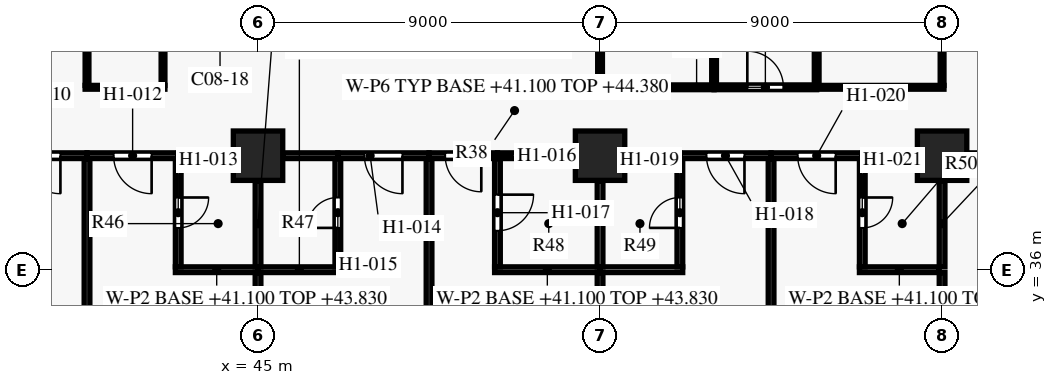
"""IFC4 building model, lengths in metres.
Left out: names, types, materials, properties, quantities, classifications, styles, units other than length and angle.
Written with IfcOpenShell. Run it as: python <this file> out.ifc"""

import sys

from ifc_helpers import new_model, si_unit, direction, frame, frame_2d, origin, origin_2d, place, context, subcontext, project, spatial, rectangle, extrude, element, fill, save


model = new_model("IFC4")
c1 = context("Model", 3, precision=1e-05, world=origin(), true_north=direction((0.0, 1.0)))
c2 = subcontext(c1, "Body", "Model", "MODEL_VIEW")
j1 = project(units=[si_unit("LENGTHUNIT", "METRE"), si_unit("PLANEANGLEUNIT", "RADIAN")], contexts=[c1])
p1 = place(None, origin())
s1 = spatial("IfcSite", under=j1, at=p1, CompositionType="ELEMENT")
p2 = place(p1, origin())
s2 = spatial("IfcBuilding", under=s1, at=p2, CompositionType="ELEMENT")
p3 = place(p2, frame((0.0, 0.0, 41.1)))
s3 = spatial("IfcBuildingStorey", under=s2, at=p3, CompositionType="ELEMENT", Elevation=41.1)
for number, where, z_axis, x_axis in (
    (1, (45.0, 39.0, 0.0), (0.0, 0.0, 1.0), (1.0, 0.0, 0.0)),
    (2, (54.0, 39.0, 0.0), (0.0, 0.0, 1.0), (1.0, 0.0, 0.0)),
    (3, (63.0, 39.0, 0.0), (0.0, 0.0, 1.0), (1.0, 0.0, 0.0)),
):
    element("IfcColumn", number, at=place(p3, frame(where, z_axis=z_axis, x_axis=x_axis)), inside=s3, PredefinedType="COLUMN", context=c2, shape_type="SweptSolid", body=[
        extrude(rectangle(XDim=1.3, YDim=1.3, at=origin_2d()), origin(), (0.0, 0.0, 1.0), 3.6),
    ])
p4 = place(p3, frame((45.0, 35.925, 0.0), z_axis=(0.0, 0.0, 1.0), x_axis=(0.0, -1.0, 0.0)))
e4 = element("IfcWall", 4, at=p4, inside=s3, PredefinedType="PARTITIONING", context=c2, shape_type="SweptSolid", body=[
    extrude(rectangle(XDim=8.8, YDim=0.15, at=frame_2d((4.4, 0.0))), origin(), (0.0, 0.0, 1.0), 2.73),
])
p5 = place(p3, frame((54.0, 35.925, 0.0), z_axis=(0.0, 0.0, 1.0), x_axis=(0.0, -1.0, 0.0)))
e5 = element("IfcWall", 5, at=p5, inside=s3, PredefinedType="PARTITIONING", context=c2, shape_type="SweptSolid", body=[
    extrude(rectangle(XDim=7.9, YDim=0.15, at=frame_2d((3.95, 0.0))), origin(), (0.0, 0.0, 1.0), 2.73),
])
p6 = place(p3, frame((63.0, 35.925, 0.0), z_axis=(0.0, 0.0, 1.0), x_axis=(0.0, -1.0, 0.0)))
e6 = element("IfcWall", 6, at=p6, inside=s3, PredefinedType="PARTITIONING", context=c2, shape_type="SweptSolid", body=[
    extrude(rectangle(XDim=8.8, YDim=0.15, at=frame_2d((4.4, 0.0))), origin(), (0.0, 0.0, 1.0), 2.73),
])
for number, where, z_axis, x_axis in (
    (7, (42.825, 36.0, 0.0), (0.0, 0.0, 1.0), (1.0, 0.0, 0.0)),
    (8, (45.0, 36.0, 0.0), (0.0, 0.0, 1.0), (1.0, 0.0, 0.0)),
):
    element("IfcWall", number, at=place(p3, frame(where, z_axis=z_axis, x_axis=x_axis)), inside=s3, PredefinedType="PARTITIONING", context=c2, shape_type="SweptSolid", body=[
        extrude(rectangle(XDim=2.175, YDim=0.15, at=frame_2d((1.087, 0.0))), origin(), (0.0, 0.0, 1.0), 2.73),
    ])
p7 = place(p3, frame((51.225, 36.0, 0.0), z_axis=(0.0, 0.0, 1.0), x_axis=(1.0, 0.0, 0.0)))
e9 = element("IfcWall", 9, at=p7, inside=s3, PredefinedType="PARTITIONING", context=c2, shape_type="SweptSolid", body=[
    extrude(rectangle(XDim=2.775, YDim=0.15, at=frame_2d((1.387, 0.0))), origin(), (0.0, 0.0, 1.0), 2.73),
])
p8 = place(p3, frame((54.0, 36.0, 0.0), z_axis=(0.0, 0.0, 1.0), x_axis=(1.0, 0.0, 0.0)))
e10 = element("IfcWall", 10, at=p8, inside=s3, PredefinedType="PARTITIONING", context=c2, shape_type="SweptSolid", body=[
    extrude(rectangle(XDim=2.175, YDim=0.15, at=frame_2d((1.087, 0.0))), origin(), (0.0, 0.0, 1.0), 2.73),
])
p9 = place(p3, frame((60.825, 36.0, 0.0), z_axis=(0.0, 0.0, 1.0), x_axis=(1.0, 0.0, 0.0)))
e11 = element("IfcWall", 11, at=p9, inside=s3, PredefinedType="PARTITIONING", context=c2, shape_type="SweptSolid", body=[
    extrude(rectangle(XDim=2.1, YDim=0.15, at=frame_2d((1.05, 0.0))), origin(), (0.0, 0.0, 1.0), 2.73),
])
p10 = place(p3, frame((47.1, 36.075, 0.0), z_axis=(0.0, 0.0, 1.0), x_axis=(0.0, 1.0, 0.0)))
e12 = element("IfcWall", 12, at=p10, inside=s3, PredefinedType="PARTITIONING", context=c2, shape_type="SweptSolid", body=[
    extrude(rectangle(XDim=2.85, YDim=0.15, at=frame_2d((1.425, 0.0))), origin(), (0.0, 0.0, 1.0), 2.58),
])
p11 = place(p10, frame((1.025, 0.0, 0.0)))
e13 = element("IfcOpeningElement", 13, at=p11, cuts=e12, PredefinedType="OPENING", context=c2, shape_type="SweptSolid", body=[
    extrude(rectangle(XDim=0.8, YDim=2.1, at=frame_2d((0.4, 1.05))), frame((0.0, 0.085, 0.0), z_axis=(0.0, -1.0, 0.0), x_axis=(1.0, 0.0, 0.0)), (0.0, 0.0, 1.0), 0.17),
])
p12 = place(p3, frame((56.1, 36.075, 0.0), z_axis=(0.0, 0.0, 1.0), x_axis=(0.0, 1.0, 0.0)))
e14 = element("IfcWall", 14, at=p12, inside=s3, PredefinedType="PARTITIONING", context=c2, shape_type="SweptSolid", body=[
    extrude(rectangle(XDim=2.85, YDim=0.15, at=frame_2d((1.425, 0.0))), origin(), (0.0, 0.0, 1.0), 2.58),
])
p13 = place(p12, frame((1.025, 0.0, 0.0)))
e15 = element("IfcOpeningElement", 15, at=p13, cuts=e14, PredefinedType="OPENING", context=c2, shape_type="SweptSolid", body=[
    extrude(rectangle(XDim=0.8, YDim=2.1, at=frame_2d((0.4, 1.05))), frame((0.0, 0.085, 0.0), z_axis=(0.0, -1.0, 0.0), x_axis=(1.0, 0.0, 0.0)), (0.0, 0.0, 1.0), 0.17),
])
for number, where, z_axis, x_axis in (
    (16, (45.0, 38.345, 0.0), (0.0, 0.0, 1.0), (0.0, -1.0, 0.0)),
    (17, (54.0, 38.345, 0.0), (0.0, 0.0, 1.0), (0.0, -1.0, 0.0)),
    (18, (63.0, 38.345, 0.0), (0.0, 0.0, 1.0), (0.0, -1.0, 0.0)),
):
    element("IfcWall", number, at=place(p3, frame(where, z_axis=z_axis, x_axis=x_axis)), inside=s3, PredefinedType="PARTITIONING", context=c2, shape_type="SweptSolid", body=[
        extrude(rectangle(XDim=2.27, YDim=0.15, at=frame_2d((1.135, 0.0))), origin(), (0.0, 0.0, 1.0), 2.73),
    ])
p14 = place(p3, frame((40.5, 38.925, 0.0), z_axis=(0.0, 0.0, 1.0), x_axis=(0.0, -1.0, 0.0)))
e19 = element("IfcWall", 19, at=p14, inside=s3, PredefinedType="PARTITIONING", context=c2, shape_type="SweptSolid", body=[
    extrude(rectangle(XDim=11.35, YDim=0.15, at=frame_2d((5.675, 0.0))), origin(), (0.0, 0.0, 1.0), 2.58),
])
p15 = place(p3, frame((42.9, 38.925, 0.0), z_axis=(0.0, 0.0, 1.0), x_axis=(0.0, -1.0, 0.0)))
e20 = element("IfcWall", 20, at=p15, inside=s3, PredefinedType="PARTITIONING", context=c2, shape_type="SweptSolid", body=[
    extrude(rectangle(XDim=2.85, YDim=0.15, at=frame_2d((1.425, 0.0))), origin(), (0.0, 0.0, 1.0), 2.58),
])
p16 = place(p15, frame((1.025, 0.0, 0.0)))
e21 = element("IfcOpeningElement", 21, at=p16, cuts=e20, PredefinedType="OPENING", context=c2, shape_type="SweptSolid", body=[
    extrude(rectangle(XDim=0.8, YDim=2.1, at=frame_2d((0.4, 1.05))), frame((0.0, 0.085, 0.0), z_axis=(0.0, -1.0, 0.0), x_axis=(1.0, 0.0, 0.0)), (0.0, 0.0, 1.0), 0.17),
])
p17 = place(p3, frame((49.5, 38.925, 0.0), z_axis=(0.0, 0.0, 1.0), x_axis=(0.0, -1.0, 0.0)))
e22 = element("IfcWall", 22, at=p17, inside=s3, PredefinedType="PARTITIONING", context=c2, shape_type="SweptSolid", body=[
    extrude(rectangle(XDim=11.35, YDim=0.15, at=frame_2d((5.675, 0.0))), origin(), (0.0, 0.0, 1.0), 2.58),
])
p18 = place(p3, frame((51.3, 38.925, 0.0), z_axis=(0.0, 0.0, 1.0), x_axis=(0.0, -1.0, 0.0)))
e23 = element("IfcWall", 23, at=p18, inside=s3, PredefinedType="PARTITIONING", context=c2, shape_type="SweptSolid", body=[
    extrude(rectangle(XDim=2.85, YDim=0.15, at=frame_2d((1.425, 0.0))), origin(), (0.0, 0.0, 1.0), 2.58),
])
p19 = place(p18, frame((0.95, 0.0, 0.0)))
e24 = element("IfcOpeningElement", 24, at=p19, cuts=e23, PredefinedType="OPENING", context=c2, shape_type="SweptSolid", body=[
    extrude(rectangle(XDim=0.95, YDim=2.1, at=frame_2d((0.475, 1.05))), frame((0.0, 0.085, 0.0), z_axis=(0.0, -1.0, 0.0), x_axis=(1.0, 0.0, 0.0)), (0.0, 0.0, 1.0), 0.17),
])
p20 = place(p3, frame((58.5, 38.925, 0.0), z_axis=(0.0, 0.0, 1.0), x_axis=(0.0, -1.0, 0.0)))
e25 = element("IfcWall", 25, at=p20, inside=s3, PredefinedType="PARTITIONING", context=c2, shape_type="SweptSolid", body=[
    extrude(rectangle(XDim=11.35, YDim=0.15, at=frame_2d((5.675, 0.0))), origin(), (0.0, 0.0, 1.0), 2.58),
])
p21 = place(p3, frame((60.9, 38.925, 0.0), z_axis=(0.0, 0.0, 1.0), x_axis=(0.0, -1.0, 0.0)))
e26 = element("IfcWall", 26, at=p21, inside=s3, PredefinedType="PARTITIONING", context=c2, shape_type="SweptSolid", body=[
    extrude(rectangle(XDim=2.85, YDim=0.15, at=frame_2d((1.425, 0.0))), origin(), (0.0, 0.0, 1.0), 2.58),
])
p22 = place(p21, frame((1.025, 0.0, 0.0)))
e27 = element("IfcOpeningElement", 27, at=p22, cuts=e26, PredefinedType="OPENING", context=c2, shape_type="SweptSolid", body=[
    extrude(rectangle(XDim=0.8, YDim=2.1, at=frame_2d((0.4, 1.05))), frame((0.0, 0.085, 0.0), z_axis=(0.0, -1.0, 0.0), x_axis=(1.0, 0.0, 0.0)), (0.0, 0.0, 1.0), 0.17),
])
p23 = place(p3, frame((40.5, 39.0, 0.0), z_axis=(0.0, 0.0, 1.0), x_axis=(-1.0, 0.0, 0.0)))
e28 = element("IfcWall", 28, at=p23, inside=s3, PredefinedType="PARTITIONING", context=c2, shape_type="SweptSolid", body=[
    extrude(rectangle(XDim=2.4, YDim=0.15, at=frame_2d((1.2, 0.0))), origin(), (0.0, 0.0, 1.0), 2.58),
])
p24 = place(p23, frame((0.7, 0.0, 0.0)))
e29 = element("IfcOpeningElement", 29, at=p24, cuts=e28, PredefinedType="OPENING", context=c2, shape_type="SweptSolid", body=[
    extrude(rectangle(XDim=1.0, YDim=2.1, at=frame_2d((0.5, 1.05))), frame((0.0, 0.085, 0.0), z_axis=(0.0, -1.0, 0.0), x_axis=(1.0, 0.0, 0.0)), (0.0, 0.0, 1.0), 0.17),
])
p25 = place(p3, frame((42.9, 39.0, 0.0), z_axis=(0.0, 0.0, 1.0), x_axis=(-1.0, 0.0, 0.0)))
e30 = element("IfcWall", 30, at=p25, inside=s3, PredefinedType="PARTITIONING", context=c2, shape_type="SweptSolid", body=[
    extrude(rectangle(XDim=2.4, YDim=0.15, at=frame_2d((1.2, 0.0))), origin(), (0.0, 0.0, 1.0), 2.58),
])
p26 = place(p25, frame((0.7, 0.0, 0.0)))
e31 = element("IfcOpeningElement", 31, at=p26, cuts=e30, PredefinedType="OPENING", context=c2, shape_type="SweptSolid", body=[
    extrude(rectangle(XDim=1.0, YDim=2.1, at=frame_2d((0.5, 1.05))), frame((0.0, 0.085, 0.0), z_axis=(0.0, -1.0, 0.0), x_axis=(1.0, 0.0, 0.0)), (0.0, 0.0, 1.0), 0.17),
])
for number, where, z_axis, x_axis in (
    (32, (44.345, 39.0, 0.0), (0.0, 0.0, 1.0), (-1.0, 0.0, 0.0)),
    (33, (47.1, 39.0, 0.0), (0.0, 0.0, 1.0), (-1.0, 0.0, 0.0)),
):
    element("IfcWall", number, at=place(p3, frame(where, z_axis=z_axis, x_axis=x_axis)), inside=s3, PredefinedType="PARTITIONING", context=c2, shape_type="SweptSolid", body=[
        extrude(rectangle(XDim=1.445, YDim=0.15, at=frame_2d((0.723, 0.0))), origin(), (0.0, 0.0, 1.0), 2.58),
    ])
p27 = place(p3, frame((49.5, 39.0, 0.0), z_axis=(0.0, 0.0, 1.0), x_axis=(-1.0, 0.0, 0.0)))
e34 = element("IfcWall", 34, at=p27, inside=s3, PredefinedType="PARTITIONING", context=c2, shape_type="SweptSolid", body=[
    extrude(rectangle(XDim=2.4, YDim=0.15, at=frame_2d((1.2, 0.0))), origin(), (0.0, 0.0, 1.0), 2.58),
])
p28 = place(p27, frame((0.7, 0.0, 0.0)))
e35 = element("IfcOpeningElement", 35, at=p28, cuts=e34, PredefinedType="OPENING", context=c2, shape_type="SweptSolid", body=[
    extrude(rectangle(XDim=1.0, YDim=2.1, at=frame_2d((0.5, 1.05))), frame((0.0, 0.085, 0.0), z_axis=(0.0, -1.0, 0.0), x_axis=(1.0, 0.0, 0.0)), (0.0, 0.0, 1.0), 0.17),
])
p29 = place(p3, frame((51.3, 39.0, 0.0), z_axis=(0.0, 0.0, 1.0), x_axis=(-1.0, 0.0, 0.0)))
e36 = element("IfcWall", 36, at=p29, inside=s3, PredefinedType="PARTITIONING", context=c2, shape_type="SweptSolid", body=[
    extrude(rectangle(XDim=1.8, YDim=0.15, at=frame_2d((0.9, 0.0))), origin(), (0.0, 0.0, 1.0), 2.58),
])
p30 = place(p29, frame((0.425, 0.0, 0.0)))
e37 = element("IfcOpeningElement", 37, at=p30, cuts=e36, PredefinedType="OPENING", context=c2, shape_type="SweptSolid", body=[
    extrude(rectangle(XDim=0.95, YDim=2.1, at=frame_2d((0.475, 1.05))), frame((0.0, 0.085, 0.0), z_axis=(0.0, -1.0, 0.0), x_axis=(1.0, 0.0, 0.0)), (0.0, 0.0, 1.0), 0.17),
])
p31 = place(p3, frame((53.345, 39.0, 0.0), z_axis=(0.0, 0.0, 1.0), x_axis=(-1.0, 0.0, 0.0)))
e38 = element("IfcWall", 38, at=p31, inside=s3, PredefinedType="PARTITIONING", context=c2, shape_type="SweptSolid", body=[
    extrude(rectangle(XDim=2.045, YDim=0.15, at=frame_2d((1.022, 0.0))), origin(), (0.0, 0.0, 1.0), 2.58),
])
p32 = place(p3, frame((56.1, 39.0, 0.0), z_axis=(0.0, 0.0, 1.0), x_axis=(-1.0, 0.0, 0.0)))
e39 = element("IfcWall", 39, at=p32, inside=s3, PredefinedType="PARTITIONING", context=c2, shape_type="SweptSolid", body=[
    extrude(rectangle(XDim=1.445, YDim=0.15, at=frame_2d((0.723, 0.0))), origin(), (0.0, 0.0, 1.0), 2.58),
])
p33 = place(p3, frame((58.5, 39.0, 0.0), z_axis=(0.0, 0.0, 1.0), x_axis=(-1.0, 0.0, 0.0)))
e40 = element("IfcWall", 40, at=p33, inside=s3, PredefinedType="PARTITIONING", context=c2, shape_type="SweptSolid", body=[
    extrude(rectangle(XDim=2.4, YDim=0.15, at=frame_2d((1.2, 0.0))), origin(), (0.0, 0.0, 1.0), 2.58),
])
p34 = place(p33, frame((0.7, 0.0, 0.0)))
e41 = element("IfcOpeningElement", 41, at=p34, cuts=e40, PredefinedType="OPENING", context=c2, shape_type="SweptSolid", body=[
    extrude(rectangle(XDim=1.0, YDim=2.1, at=frame_2d((0.5, 1.05))), frame((0.0, 0.085, 0.0), z_axis=(0.0, -1.0, 0.0), x_axis=(1.0, 0.0, 0.0)), (0.0, 0.0, 1.0), 0.17),
])
p35 = place(p3, frame((60.9, 39.0, 0.0), z_axis=(0.0, 0.0, 1.0), x_axis=(-1.0, 0.0, 0.0)))
e42 = element("IfcWall", 42, at=p35, inside=s3, PredefinedType="PARTITIONING", context=c2, shape_type="SweptSolid", body=[
    extrude(rectangle(XDim=2.4, YDim=0.15, at=frame_2d((1.2, 0.0))), origin(), (0.0, 0.0, 1.0), 2.58),
])
p36 = place(p35, frame((0.7, 0.0, 0.0)))
e43 = element("IfcOpeningElement", 43, at=p36, cuts=e42, PredefinedType="OPENING", context=c2, shape_type="SweptSolid", body=[
    extrude(rectangle(XDim=1.0, YDim=2.1, at=frame_2d((0.5, 1.05))), frame((0.0, 0.085, 0.0), z_axis=(0.0, -1.0, 0.0), x_axis=(1.0, 0.0, 0.0)), (0.0, 0.0, 1.0), 0.17),
])
p37 = place(p3, frame((62.345, 39.0, 0.0), z_axis=(0.0, 0.0, 1.0), x_axis=(-1.0, 0.0, 0.0)))
e44 = element("IfcWall", 44, at=p37, inside=s3, PredefinedType="PARTITIONING", context=c2, shape_type="SweptSolid", body=[
    extrude(rectangle(XDim=1.445, YDim=0.15, at=frame_2d((0.723, 0.0))), origin(), (0.0, 0.0, 1.0), 2.58),
])
p38 = place(p3, frame((64.875, 39.0, 0.0), z_axis=(0.0, 0.0, 1.0), x_axis=(-1.0, 0.0, 0.0)))
e45 = element("IfcWall", 45, at=p38, inside=s3, PredefinedType="PARTITIONING", context=c2, shape_type="SweptSolid", body=[
    extrude(rectangle(XDim=1.22, YDim=0.15, at=frame_2d((0.61, 0.0))), origin(), (0.0, 0.0, 1.0), 2.58),
])
p39 = place(p3, frame((40.45, 40.8, 0.0), z_axis=(0.0, 0.0, 1.0), x_axis=(1.0, 0.0, 0.0)))
e46 = element("IfcWall", 46, at=p39, inside=s3, PredefinedType="PARTITIONING", context=c2, shape_type="SweptSolid", body=[
    extrude(rectangle(XDim=2.1, YDim=0.1, at=frame_2d((1.05, 0.0))), origin(), (0.0, 0.0, 1.0), 3.28),
])
p40 = place(p3, frame((53.938, 40.8, 0.0), z_axis=(0.0, 0.0, 1.0), x_axis=(1.0, 0.0, 0.0)))
e47 = element("IfcWall", 47, at=p40, inside=s3, PredefinedType="PARTITIONING", context=c2, shape_type="SweptSolid", body=[
    extrude(rectangle(XDim=3.062, YDim=0.125, at=frame_2d((1.531, 0.0))), origin(), (0.0, 0.0, 1.0), 2.73),
])
p41 = place(p3, frame((57.0, 40.8, 0.0), z_axis=(0.0, 0.0, 1.0), x_axis=(1.0, 0.0, 0.0)))
e48 = element("IfcWall", 48, at=p41, inside=s3, PredefinedType="PARTITIONING", context=c2, shape_type="SweptSolid", body=[
    extrude(rectangle(XDim=2.7, YDim=0.125, at=frame_2d((1.35, 0.0))), origin(), (0.0, 0.0, 1.0), 3.28),
])
p42 = place(p41, frame((0.875, 0.0, 0.0)))
e49 = element("IfcOpeningElement", 49, at=p42, cuts=e48, PredefinedType="OPENING", context=c2, shape_type="SweptSolid", body=[
    extrude(rectangle(XDim=0.95, YDim=2.1, at=frame_2d((0.475, 1.05))), frame((0.0, 0.073, 0.0), z_axis=(0.0, -1.0, 0.0), x_axis=(1.0, 0.0, 0.0)), (0.0, 0.0, 1.0), 0.145),
])
p43 = place(p3, frame((59.7, 40.8, 0.0), z_axis=(0.0, 0.0, 1.0), x_axis=(1.0, 0.0, 0.0)))
e50 = element("IfcWall", 50, at=p43, inside=s3, PredefinedType="PARTITIONING", context=c2, shape_type="SweptSolid", body=[
    extrude(rectangle(XDim=3.35, YDim=0.1, at=frame_2d((1.675, 0.0))), origin(), (0.0, 0.0, 1.0), 2.73),
])
p44 = place(p3, frame((63.0, 40.85, 0.0), z_axis=(0.0, 0.0, 1.0), x_axis=(0.0, 1.0, 0.0)))
e51 = element("IfcWall", 51, at=p44, inside=s3, PredefinedType="PARTITIONING", context=c2, shape_type="SweptSolid", body=[
    extrude(rectangle(XDim=8.3, YDim=0.1, at=frame_2d((4.15, 0.0))), origin(), (0.0, 0.0, 1.0), 2.73),
])
p45 = place(p3, frame((54.0, 49.137, 0.0), z_axis=(0.0, 0.0, 1.0), x_axis=(0.0, -1.0, 0.0)))
e52 = element("IfcWall", 52, at=p45, inside=s3, PredefinedType="PARTITIONING", context=c2, shape_type="SweptSolid", body=[
    extrude(rectangle(XDim=8.275, YDim=0.125, at=frame_2d((4.137, 0.0))), origin(), (0.0, 0.0, 1.0), 2.73),
])
for number, where, z_axis, x_axis in (
    (53, (57.0, 49.137, 0.0), (0.0, 0.0, 1.0), (0.0, -1.0, 0.0)),
    (54, (59.7, 49.137, 0.0), (0.0, 0.0, 1.0), (0.0, -1.0, 0.0)),
):
    element("IfcWall", number, at=place(p3, frame(where, z_axis=z_axis, x_axis=x_axis)), inside=s3, PredefinedType="PARTITIONING", context=c2, shape_type="SweptSolid", body=[
        extrude(rectangle(XDim=8.275, YDim=0.125, at=frame_2d((4.137, 0.0))), origin(), (0.0, 0.0, 1.0), 3.28),
    ])
for number, where, z_axis, x_axis in (
    (55, (40.5, 49.15, 0.0), (0.0, 0.0, 1.0), (0.0, -1.0, 0.0)),
    (56, (42.5, 49.15, 0.0), (0.0, 0.0, 1.0), (0.0, -1.0, 0.0)),
):
    element("IfcWall", number, at=place(p3, frame(where, z_axis=z_axis, x_axis=x_axis)), inside=s3, PredefinedType="PARTITIONING", context=c2, shape_type="SweptSolid", body=[
        extrude(rectangle(XDim=8.3, YDim=0.1, at=frame_2d((4.15, 0.0))), origin(), (0.0, 0.0, 1.0), 3.28),
    ])
p46 = place(p24, origin())
e57 = element("IfcDoor", 57, at=p46, inside=s3, OperationType="SINGLE_SWING_LEFT", PredefinedType="DOOR", context=c2, shape_type="SweptSolid", body=[
    extrude(rectangle(XDim=1.0, YDim=2.1, at=frame_2d((0.5, 1.05))), frame((0.0, 0.025, 0.0), z_axis=(0.0, -1.0, 0.0), x_axis=(1.0, 0.0, 0.0)), (0.0, 0.0, 1.0), 0.05),
])
fill(e29, e57)
p47 = place(p26, origin())
e58 = element("IfcDoor", 58, at=p47, inside=s3, OperationType="SINGLE_SWING_LEFT", PredefinedType="DOOR", context=c2, shape_type="SweptSolid", body=[
    extrude(rectangle(XDim=1.0, YDim=2.1, at=frame_2d((0.5, 1.05))), frame((0.0, 0.025, 0.0), z_axis=(0.0, -1.0, 0.0), x_axis=(1.0, 0.0, 0.0)), (0.0, 0.0, 1.0), 0.05),
])
fill(e31, e58)
p48 = place(p16, origin())
e59 = element("IfcDoor", 59, at=p48, inside=s3, OperationType="SINGLE_SWING_LEFT", PredefinedType="DOOR", context=c2, shape_type="SweptSolid", body=[
    extrude(rectangle(XDim=0.8, YDim=2.1, at=frame_2d((0.4, 1.05))), frame((0.0, 0.025, 0.0), z_axis=(0.0, -1.0, 0.0), x_axis=(1.0, 0.0, 0.0)), (0.0, 0.0, 1.0), 0.05),
])
fill(e21, e59)
p49 = place(p28, origin())
e60 = element("IfcDoor", 60, at=p49, inside=s3, OperationType="SINGLE_SWING_LEFT", PredefinedType="DOOR", context=c2, shape_type="SweptSolid", body=[
    extrude(rectangle(XDim=1.0, YDim=2.1, at=frame_2d((0.5, 1.05))), frame((0.0, 0.025, 0.0), z_axis=(0.0, -1.0, 0.0), x_axis=(1.0, 0.0, 0.0)), (0.0, 0.0, 1.0), 0.05),
])
fill(e35, e60)
p50 = place(p11, origin())
e61 = element("IfcDoor", 61, at=p50, inside=s3, OperationType="SINGLE_SWING_LEFT", PredefinedType="DOOR", context=c2, shape_type="SweptSolid", body=[
    extrude(rectangle(XDim=0.8, YDim=2.1, at=frame_2d((0.4, 1.05))), frame((0.0, 0.025, 0.0), z_axis=(0.0, -1.0, 0.0), x_axis=(1.0, 0.0, 0.0)), (0.0, 0.0, 1.0), 0.05),
])
fill(e13, e61)
p51 = place(p30, origin())
e62 = element("IfcDoor", 62, at=p51, inside=s3, OperationType="SINGLE_SWING_LEFT", PredefinedType="DOOR", context=c2, shape_type="SweptSolid", body=[
    extrude(rectangle(XDim=0.95, YDim=2.1, at=frame_2d((0.475, 1.05))), frame((0.0, 0.025, 0.0), z_axis=(0.0, -1.0, 0.0), x_axis=(1.0, 0.0, 0.0)), (0.0, 0.0, 1.0), 0.05),
])
fill(e37, e62)
p52 = place(p19, origin())
e63 = element("IfcDoor", 63, at=p52, inside=s3, OperationType="SINGLE_SWING_LEFT", PredefinedType="DOOR", context=c2, shape_type="SweptSolid", body=[
    extrude(rectangle(XDim=0.95, YDim=2.1, at=frame_2d((0.475, 1.05))), frame((0.0, 0.025, 0.0), z_axis=(0.0, -1.0, 0.0), x_axis=(1.0, 0.0, 0.0)), (0.0, 0.0, 1.0), 0.05),
])
fill(e24, e63)
p53 = place(p34, origin())
e64 = element("IfcDoor", 64, at=p53, inside=s3, OperationType="SINGLE_SWING_LEFT", PredefinedType="DOOR", context=c2, shape_type="SweptSolid", body=[
    extrude(rectangle(XDim=1.0, YDim=2.1, at=frame_2d((0.5, 1.05))), frame((0.0, 0.025, 0.0), z_axis=(0.0, -1.0, 0.0), x_axis=(1.0, 0.0, 0.0)), (0.0, 0.0, 1.0), 0.05),
])
fill(e41, e64)
p54 = place(p13, origin())
e65 = element("IfcDoor", 65, at=p54, inside=s3, OperationType="SINGLE_SWING_LEFT", PredefinedType="DOOR", context=c2, shape_type="SweptSolid", body=[
    extrude(rectangle(XDim=0.8, YDim=2.1, at=frame_2d((0.4, 1.05))), frame((0.0, 0.025, 0.0), z_axis=(0.0, -1.0, 0.0), x_axis=(1.0, 0.0, 0.0)), (0.0, 0.0, 1.0), 0.05),
])
fill(e15, e65)
p55 = place(p36, origin())
e66 = element("IfcDoor", 66, at=p55, inside=s3, OperationType="SINGLE_SWING_LEFT", PredefinedType="DOOR", context=c2, shape_type="SweptSolid", body=[
    extrude(rectangle(XDim=1.0, YDim=2.1, at=frame_2d((0.5, 1.05))), frame((0.0, 0.025, 0.0), z_axis=(0.0, -1.0, 0.0), x_axis=(1.0, 0.0, 0.0)), (0.0, 0.0, 1.0), 0.05),
])
fill(e43, e66)
p56 = place(p22, origin())
e67 = element("IfcDoor", 67, at=p56, inside=s3, OperationType="SINGLE_SWING_LEFT", PredefinedType="DOOR", context=c2, shape_type="SweptSolid", body=[
    extrude(rectangle(XDim=0.8, YDim=2.1, at=frame_2d((0.4, 1.05))), frame((0.0, 0.025, 0.0), z_axis=(0.0, -1.0, 0.0), x_axis=(1.0, 0.0, 0.0)), (0.0, 0.0, 1.0), 0.05),
])
fill(e27, e67)
p57 = place(p42, origin())
e68 = element("IfcDoor", 68, at=p57, inside=s3, OperationType="SINGLE_SWING_LEFT", PredefinedType="DOOR", context=c2, shape_type="SweptSolid", body=[
    extrude(rectangle(XDim=0.95, YDim=2.1, at=frame_2d((0.475, 1.05))), frame((0.0, 0.025, 0.0), z_axis=(0.0, -1.0, 0.0), x_axis=(1.0, 0.0, 0.0)), (0.0, 0.0, 1.0), 0.05),
])
fill(e49, e68)
save(model, sys.argv[1])
